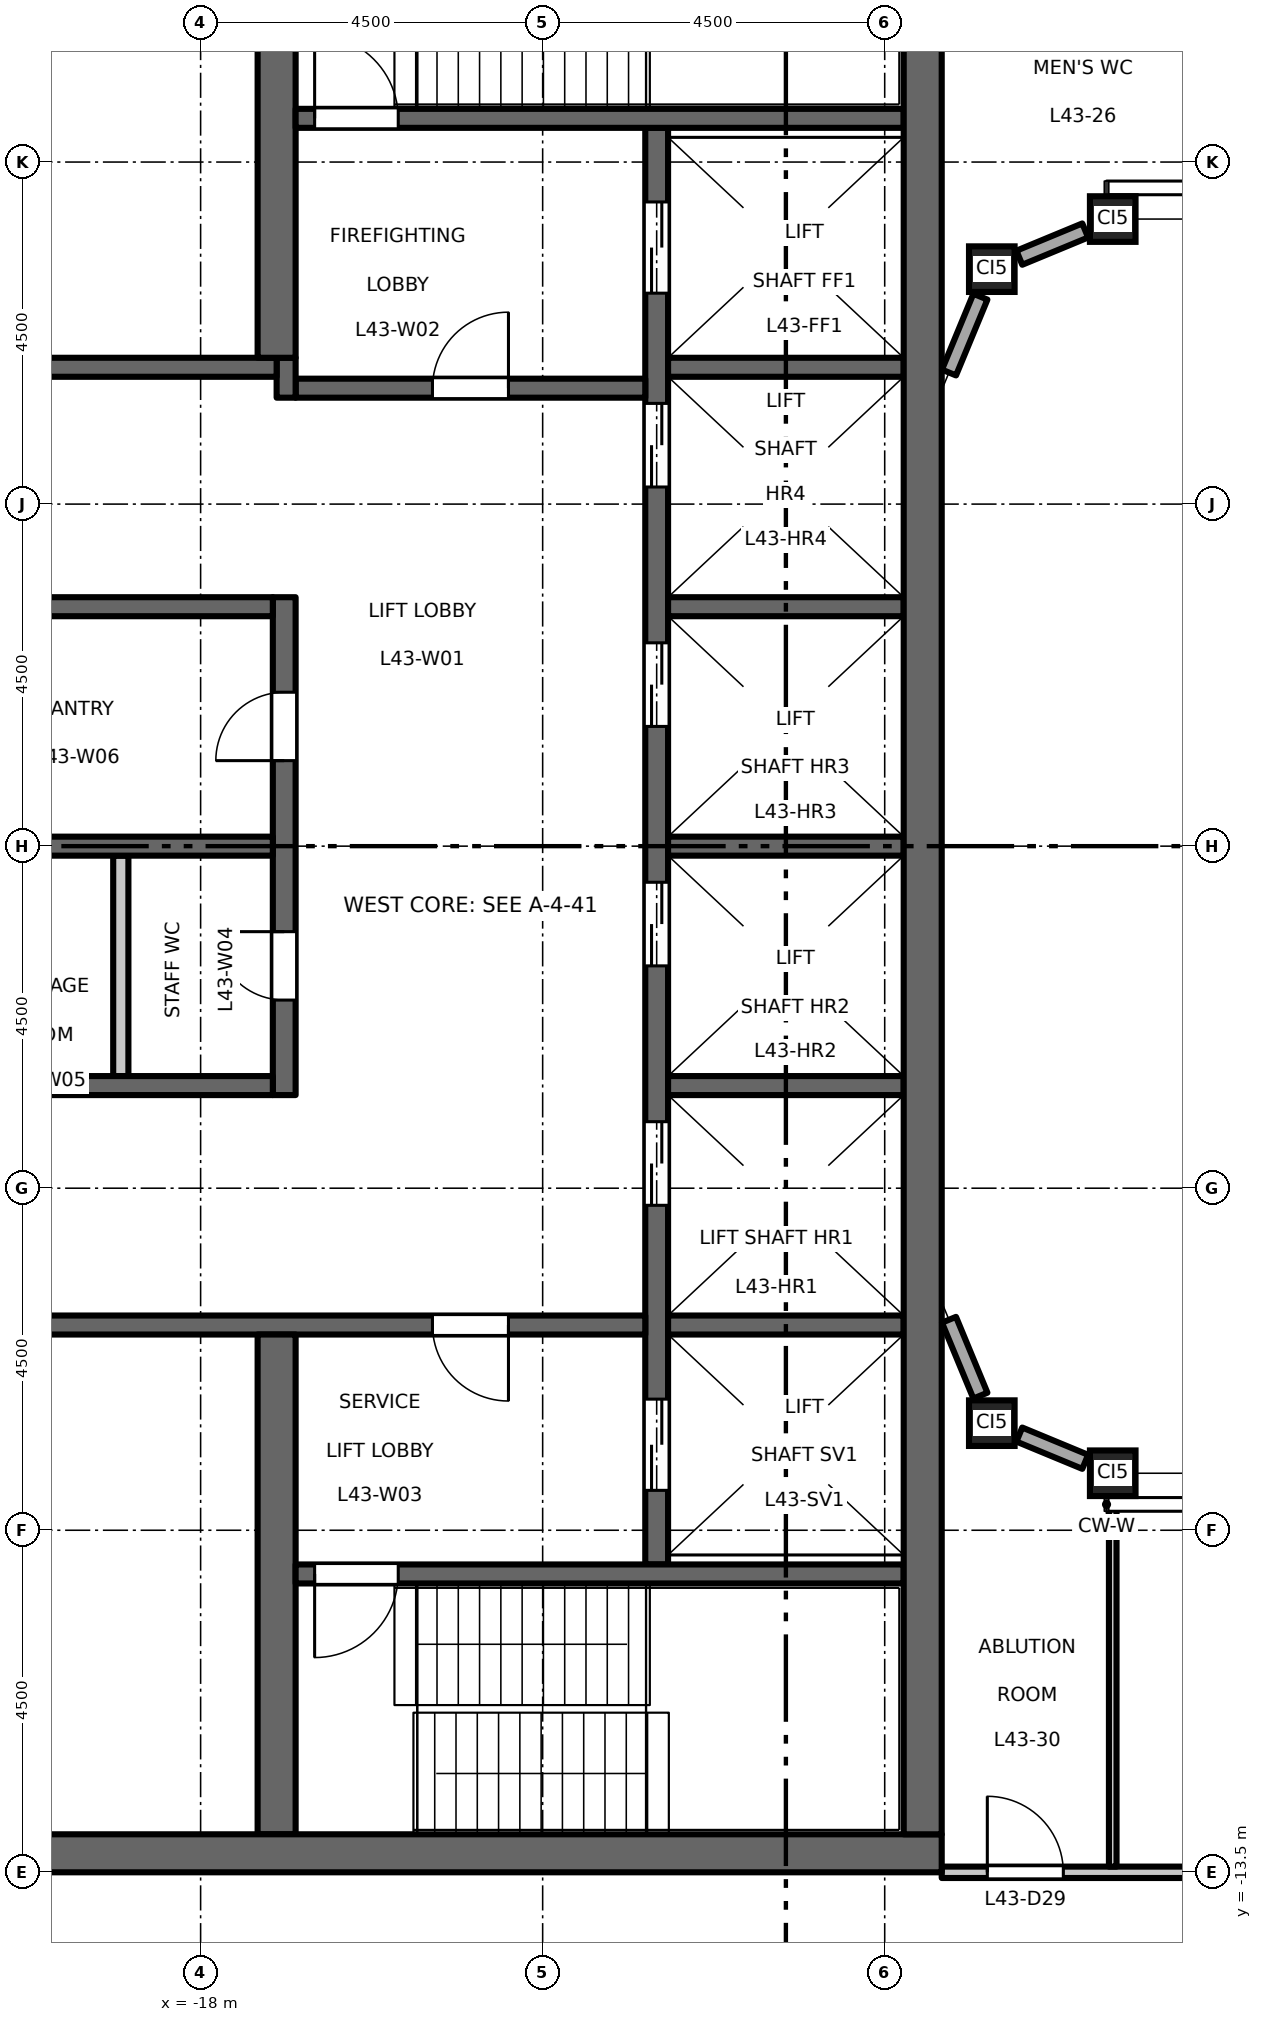
"""IFC4 building model, lengths in metres.
Left out: names, types, materials, properties, quantities, classifications, styles, units other than length and angle.
Written with IfcOpenShell. Run it as: python <this file> out.ifc"""

import sys

from ifc_helpers import new_model, si_unit, direction, frame, frame_2d, origin, origin_2d, place, context, subcontext, project, spatial, rectangle, hollow_rectangle, extrude, element, fill, save


model = new_model("IFC4")
c1 = context("Model", 3, precision=1e-05, world=origin(), true_north=direction((0.0, 1.0)))
c2 = subcontext(c1, "Body", "Model", "MODEL_VIEW")
j1 = project(units=[si_unit("LENGTHUNIT", "METRE"), si_unit("PLANEANGLEUNIT", "RADIAN")], contexts=[c1])
p1 = place(None, origin())
s1 = spatial("IfcSite", under=j1, at=p1, CompositionType="ELEMENT")
p2 = place(p1, origin())
s2 = spatial("IfcBuilding", under=s1, at=p2, CompositionType="ELEMENT")
p3 = place(p2, frame((0.0, 0.0, 201.7)))
s3 = spatial("IfcBuildingStorey", under=s2, at=p3, CompositionType="ELEMENT", Elevation=201.7)
for number, where, z_axis, x_axis in (
    (1, (-7.591, -7.591, 0.0), (0.0, 0.0, 1.0), (1.0, 0.0, 0.0)),
    (2, (-6.0, -8.25, 0.0), (0.0, 0.0, 1.0), (1.0, 0.0, 0.0)),
    (3, (-7.591, 7.591, 0.0), (0.0, 0.0, 1.0), (1.0, 0.0, 0.0)),
    (4, (-6.0, 8.25, 0.0), (0.0, 0.0, 1.0), (1.0, 0.0, 0.0)),
):
    element("IfcColumn", number, at=place(p3, frame(where, z_axis=z_axis, x_axis=x_axis)), inside=s3, PredefinedType="COLUMN", context=c2, shape_type="SweptSolid", body=[
        extrude(hollow_rectangle(XDim=0.6, YDim=0.6, WallThickness=0.032, at=origin_2d()), origin(), (0.0, 0.0, 1.0), 4.5),
    ])
p4 = place(p3, frame((-12.0, -9.45, 0.0), z_axis=(0.0, 0.0, 1.0), x_axis=(0.0, 1.0, 0.0)))
e5 = element("IfcWall", 5, at=p4, inside=s3, PredefinedType="SHEAR", context=c2, shape_type="SweptSolid", body=[
    extrude(rectangle(XDim=18.9, YDim=0.3, at=frame_2d((9.45, 0.0))), origin(), (0.0, 0.0, 1.0), 4.35),
])
p5 = place(p4, frame((4.725, 0.0, 0.0)))
e6 = element("IfcOpeningElement", 6, at=p5, cuts=e5, PredefinedType="OPENING", context=c2, shape_type="SweptSolid", body=[
    extrude(rectangle(XDim=1.1, YDim=2.1, at=frame_2d((0.55, 1.05))), frame((0.0, 0.16, 0.0), z_axis=(0.0, -1.0, 0.0), x_axis=(1.0, 0.0, 0.0)), (0.0, 0.0, 1.0), 0.32),
])
p6 = place(p4, frame((7.875, 0.0, 0.0)))
e7 = element("IfcOpeningElement", 7, at=p6, cuts=e5, PredefinedType="OPENING", context=c2, shape_type="SweptSolid", body=[
    extrude(rectangle(XDim=1.1, YDim=2.1, at=frame_2d((0.55, 1.05))), frame((0.0, 0.16, 0.0), z_axis=(0.0, -1.0, 0.0), x_axis=(1.0, 0.0, 0.0)), (0.0, 0.0, 1.0), 0.32),
])
p7 = place(p4, frame((11.025, 0.0, 0.0)))
e8 = element("IfcOpeningElement", 8, at=p7, cuts=e5, PredefinedType="OPENING", context=c2, shape_type="SweptSolid", body=[
    extrude(rectangle(XDim=1.1, YDim=2.1, at=frame_2d((0.55, 1.05))), frame((0.0, 0.16, 0.0), z_axis=(0.0, -1.0, 0.0), x_axis=(1.0, 0.0, 0.0)), (0.0, 0.0, 1.0), 0.32),
])
p8 = place(p4, frame((14.175, 0.0, 0.0)))
e9 = element("IfcOpeningElement", 9, at=p8, cuts=e5, PredefinedType="OPENING", context=c2, shape_type="SweptSolid", body=[
    extrude(rectangle(XDim=1.1, YDim=2.1, at=frame_2d((0.55, 1.05))), frame((0.0, 0.16, 0.0), z_axis=(0.0, -1.0, 0.0), x_axis=(1.0, 0.0, 0.0)), (0.0, 0.0, 1.0), 0.32),
])
p9 = place(p4, frame((16.725, 0.0, 0.0)))
e10 = element("IfcOpeningElement", 10, at=p9, cuts=e5, PredefinedType="OPENING", context=c2, shape_type="SweptSolid", body=[
    extrude(rectangle(XDim=1.2, YDim=2.1, at=frame_2d((0.6, 1.05))), frame((0.0, 0.16, 0.0), z_axis=(0.0, -1.0, 0.0), x_axis=(1.0, 0.0, 0.0)), (0.0, 0.0, 1.0), 0.32),
])
p10 = place(p4, frame((0.975, 0.0, 0.0)))
e11 = element("IfcOpeningElement", 11, at=p10, cuts=e5, PredefinedType="OPENING", context=c2, shape_type="SweptSolid", body=[
    extrude(rectangle(XDim=1.2, YDim=2.1, at=frame_2d((0.6, 1.05))), frame((0.0, 0.16, 0.0), z_axis=(0.0, -1.0, 0.0), x_axis=(1.0, 0.0, 0.0)), (0.0, 0.0, 1.0), 0.32),
])
p11 = place(p3, frame((-12.15, 6.025, 0.0), z_axis=(0.0, 0.0, 1.0), x_axis=(-1.0, 0.0, 0.0)))
e12 = element("IfcWall", 12, at=p11, inside=s3, PredefinedType="SHEAR", context=c2, shape_type="SweptSolid", body=[
    extrude(rectangle(XDim=4.6, YDim=0.25, at=frame_2d((2.3, 0.0))), origin(), (0.0, 0.0, 1.0), 4.35),
])
p12 = place(p11, frame((1.8, 0.0, 0.0)))
e13 = element("IfcOpeningElement", 13, at=p12, cuts=e12, PredefinedType="OPENING", context=c2, shape_type="SweptSolid", body=[
    extrude(rectangle(XDim=1.0, YDim=2.1, at=frame_2d((0.5, 1.05))), frame((0.0, 0.135, 0.0), z_axis=(0.0, -1.0, 0.0), x_axis=(1.0, 0.0, 0.0)), (0.0, 0.0, 1.0), 0.27),
])
p13 = place(p3, frame((-16.875, 5.9, 0.0), z_axis=(0.0, 0.0, 1.0), x_axis=(0.0, 1.0, 0.0)))
e14 = element("IfcWall", 14, at=p13, inside=s3, PredefinedType="SHEAR", context=c2, shape_type="SweptSolid", body=[
    extrude(rectangle(XDim=0.525, YDim=0.25, at=frame_2d((0.263, 0.0))), origin(), (0.0, 0.0, 1.0), 4.35),
])
p14 = place(p3, frame((-17.0, 6.3, 0.0), z_axis=(0.0, 0.0, 1.0), x_axis=(-1.0, 0.0, 0.0)))
e15 = element("IfcWall", 15, at=p14, inside=s3, PredefinedType="SHEAR", context=c2, shape_type="SweptSolid", body=[
    extrude(rectangle(XDim=4.25, YDim=0.25, at=frame_2d((2.125, 0.0))), origin(), (0.0, 0.0, 1.0), 4.35),
])
p15 = place(p3, frame((-12.15, -6.3, 0.0), z_axis=(0.0, 0.0, 1.0), x_axis=(-1.0, 0.0, 0.0)))
e16 = element("IfcWall", 16, at=p15, inside=s3, PredefinedType="SHEAR", context=c2, shape_type="SweptSolid", body=[
    extrude(rectangle(XDim=9.1, YDim=0.25, at=frame_2d((4.55, 0.0))), origin(), (0.0, 0.0, 1.0), 4.35),
])
p16 = place(p15, frame((1.8, 0.0, 0.0)))
e17 = element("IfcOpeningElement", 17, at=p16, cuts=e16, PredefinedType="OPENING", context=c2, shape_type="SweptSolid", body=[
    extrude(rectangle(XDim=1.0, YDim=2.1, at=frame_2d((0.5, 1.05))), frame((0.0, 0.135, 0.0), z_axis=(0.0, -1.0, 0.0), x_axis=(1.0, 0.0, 0.0)), (0.0, 0.0, 1.0), 0.27),
])
p17 = place(p3, frame((-16.9, -3.275, 0.0), z_axis=(0.0, 0.0, 1.0), x_axis=(0.0, 1.0, 0.0)))
e18 = element("IfcWall", 18, at=p17, inside=s3, PredefinedType="SHEAR", context=c2, shape_type="SweptSolid", body=[
    extrude(rectangle(XDim=6.55, YDim=0.3, at=frame_2d((3.275, 0.0))), origin(), (0.0, 0.0, 1.0), 4.35),
])
p18 = place(p17, frame((1.25, 0.0, 0.0)))
e19 = element("IfcOpeningElement", 19, at=p18, cuts=e18, PredefinedType="OPENING", context=c2, shape_type="SweptSolid", body=[
    extrude(rectangle(XDim=0.9, YDim=2.1, at=frame_2d((0.45, 1.05))), frame((0.0, 0.16, 0.0), z_axis=(0.0, -1.0, 0.0), x_axis=(1.0, 0.0, 0.0)), (0.0, 0.0, 1.0), 0.32),
])
p19 = place(p17, frame((4.4, 0.0, 0.0)))
e20 = element("IfcOpeningElement", 20, at=p19, cuts=e18, PredefinedType="OPENING", context=c2, shape_type="SweptSolid", body=[
    extrude(rectangle(XDim=0.9, YDim=2.1, at=frame_2d((0.45, 1.05))), frame((0.0, 0.16, 0.0), z_axis=(0.0, -1.0, 0.0), x_axis=(1.0, 0.0, 0.0)), (0.0, 0.0, 1.0), 0.32),
])
for number, where, z_axis, x_axis in (
    (21, (-17.05, 0.0, 0.0), (0.0, 0.0, 1.0), (-1.0, 0.0, 0.0)),
    (22, (-17.05, 3.15, 0.0), (0.0, 0.0, 1.0), (-1.0, 0.0, 0.0)),
    (23, (-17.05, -3.15, 0.0), (0.0, 0.0, 1.0), (-1.0, 0.0, 0.0)),
):
    element("IfcWall", number, at=place(p3, frame(where, z_axis=z_axis, x_axis=x_axis)), inside=s3, PredefinedType="SHEAR", context=c2, shape_type="SweptSolid", body=[
        extrude(rectangle(XDim=4.2, YDim=0.25, at=frame_2d((2.1, 0.0))), origin(), (0.0, 0.0, 1.0), 4.35),
    ])
p20 = place(p3, frame((-19.05, -3.025, 0.0), z_axis=(0.0, 0.0, 1.0), x_axis=(0.0, 1.0, 0.0)))
e24 = element("IfcWall", 24, at=p20, inside=s3, PredefinedType="PARTITIONING", context=c2, shape_type="SweptSolid", body=[
    extrude(rectangle(XDim=2.9, YDim=0.2, at=frame_2d((1.45, 0.0))), origin(), (0.0, 0.0, 1.0), 4.35),
])
for number, where, z_axis, x_axis in (
    (25, (-17.0, 6.425, 0.0), (0.0, 0.0, 1.0), (0.0, 1.0, 0.0)),
    (26, (-17.0, -13.0, 0.0), (0.0, 0.0, 1.0), (0.0, 1.0, 0.0)),
):
    element("IfcWall", number, at=place(p3, frame(where, z_axis=z_axis, x_axis=x_axis)), inside=s3, PredefinedType="SHEAR", context=c2, shape_type="SweptSolid", body=[
        extrude(rectangle(XDim=6.575, YDim=0.5, at=frame_2d((3.288, 0.0))), origin(), (0.0, 0.0, 1.0), 4.35),
    ])
for number, where, z_axis, x_axis in (
    (27, (-8.75, 0.0, 0.0), (0.0, 0.0, 1.0), (-1.0, 0.0, 0.0)),
    (28, (-8.75, 3.15, 0.0), (0.0, 0.0, 1.0), (-1.0, 0.0, 0.0)),
    (29, (-8.75, 6.3, 0.0), (0.0, 0.0, 1.0), (-1.0, 0.0, 0.0)),
    (30, (-8.75, -3.15, 0.0), (0.0, 0.0, 1.0), (-1.0, 0.0, 0.0)),
    (31, (-8.75, -6.3, 0.0), (0.0, 0.0, 1.0), (-1.0, 0.0, 0.0)),
):
    element("IfcWall", number, at=place(p3, frame(where, z_axis=z_axis, x_axis=x_axis)), inside=s3, PredefinedType="SHEAR", context=c2, shape_type="SweptSolid", body=[
        extrude(rectangle(XDim=3.1, YDim=0.25, at=frame_2d((1.55, 0.0))), origin(), (0.0, 0.0, 1.0), 4.35),
    ])
p21 = place(p3, frame((-8.75, 9.575, 0.0), z_axis=(0.0, 0.0, 1.0), x_axis=(-1.0, 0.0, 0.0)))
e32 = element("IfcWall", 32, at=p21, inside=s3, PredefinedType="SHEAR", context=c2, shape_type="SweptSolid", body=[
    extrude(rectangle(XDim=8.0, YDim=0.25, at=frame_2d((4.0, 0.0))), origin(), (0.0, 0.0, 1.0), 4.35),
])
p22 = place(p21, frame((6.65, 0.0, 0.0)))
e33 = element("IfcOpeningElement", 33, at=p22, cuts=e32, PredefinedType="OPENING", context=c2, shape_type="SweptSolid", body=[
    extrude(rectangle(XDim=1.1, YDim=2.1, at=frame_2d((0.55, 1.05))), frame((0.0, 0.135, 0.0), z_axis=(0.0, -1.0, 0.0), x_axis=(1.0, 0.0, 0.0)), (0.0, 0.0, 1.0), 0.27),
])
p23 = place(p3, frame((-8.75, -9.575, 0.0), z_axis=(0.0, 0.0, 1.0), x_axis=(-1.0, 0.0, 0.0)))
e34 = element("IfcWall", 34, at=p23, inside=s3, PredefinedType="SHEAR", context=c2, shape_type="SweptSolid", body=[
    extrude(rectangle(XDim=8.0, YDim=0.25, at=frame_2d((4.0, 0.0))), origin(), (0.0, 0.0, 1.0), 4.35),
])
p24 = place(p23, frame((6.65, 0.0, 0.0)))
e35 = element("IfcOpeningElement", 35, at=p24, cuts=e34, PredefinedType="OPENING", context=c2, shape_type="SweptSolid", body=[
    extrude(rectangle(XDim=1.1, YDim=2.1, at=frame_2d((0.55, 1.05))), frame((0.0, 0.135, 0.0), z_axis=(0.0, -1.0, 0.0), x_axis=(1.0, 0.0, 0.0)), (0.0, 0.0, 1.0), 0.27),
])
p25 = place(p3, frame((-8.25, -13.25, 0.0), z_axis=(0.0, 0.0, 1.0), x_axis=(-1.0, 0.0, 0.0)))
e36 = element("IfcWall", 36, at=p25, inside=s3, PredefinedType="SHEAR", context=c2, shape_type="SweptSolid", body=[
    extrude(rectangle(XDim=13.5, YDim=0.5, at=frame_2d((6.75, 0.0))), origin(), (0.0, 0.0, 1.0), 4.35),
])
p26 = place(p3, frame((-8.5, -13.0, 0.0), z_axis=(0.0, 0.0, 1.0), x_axis=(0.0, 1.0, 0.0)))
e37 = element("IfcWall", 37, at=p26, inside=s3, PredefinedType="SHEAR", context=c2, shape_type="SweptSolid", body=[
    extrude(rectangle(XDim=26.0, YDim=0.5, at=frame_2d((13.0, 0.0))), origin(), (0.0, 0.0, 1.0), 4.35),
])
p27 = place(p3, frame((-6.362, 8.1, 0.0), z_axis=(0.0, 0.0, 1.0), x_axis=(-0.923829670615, -0.382803787458, 0.0)))
e38 = element("IfcWall", 38, at=p27, inside=s3, PredefinedType="STANDARD", context=c2, shape_type="SweptSolid", body=[
    extrude(rectangle(XDim=0.938, YDim=0.2, at=frame_2d((0.469, 0.0))), origin(), (0.0, 0.0, 1.0), 3.918),
])
for number, where, z_axis, x_axis in (
    (39, (-7.741, 7.229, 0.0), (0.0, 0.0, 1.0), (-0.383, -0.924, 0.0)),
    (40, (-8.154, -6.231, 0.0), (0.0, 0.0, 1.0), (0.383, -0.924, 0.0)),
):
    element("IfcWall", number, at=place(p3, frame(where, z_axis=z_axis, x_axis=x_axis)), inside=s3, PredefinedType="STANDARD", context=c2, shape_type="SweptSolid", body=[
        extrude(rectangle(XDim=1.08, YDim=0.2, at=frame_2d((0.54, 0.0))), origin(), (0.0, 0.0, 1.0), 3.918),
    ])
p28 = place(p3, frame((-7.229, -7.741, 0.0), z_axis=(0.0, 0.0, 1.0), x_axis=(0.923829670615, -0.382803787458, 0.0)))
e41 = element("IfcWall", 41, at=p28, inside=s3, PredefinedType="STANDARD", context=c2, shape_type="SweptSolid", body=[
    extrude(rectangle(XDim=0.938, YDim=0.2, at=frame_2d((0.469, 0.0))), origin(), (0.0, 0.0, 1.0), 3.918),
])
p29 = place(p3, frame((-8.25, -13.5, 0.0), z_axis=(0.0, 0.0, 1.0), x_axis=(1.0, 0.0, 0.0)))
e42 = element("IfcWall", 42, at=p29, inside=s3, PredefinedType="PARTITIONING", context=c2, shape_type="SweptSolid", body=[
    extrude(rectangle(XDim=16.5, YDim=0.15, at=frame_2d((8.25, 0.0))), origin(), (0.0, 0.0, 1.0), 3.95),
])
p30 = place(p29, frame((0.6, 0.0, 0.0)))
e43 = element("IfcOpeningElement", 43, at=p30, cuts=e42, PredefinedType="OPENING", context=c2, shape_type="SweptSolid", body=[
    extrude(rectangle(XDim=1.0, YDim=2.1, at=frame_2d((0.5, 1.05))), frame((0.0, 0.085, 0.0), z_axis=(0.0, -1.0, 0.0), x_axis=(1.0, 0.0, 0.0)), (0.0, 0.0, 1.0), 0.17),
])
p31 = place(p29, frame((8.85, 0.0, 0.0)))
e44 = element("IfcOpeningElement", 44, at=p31, cuts=e42, PredefinedType="OPENING", context=c2, shape_type="SweptSolid", body=[
    extrude(rectangle(XDim=1.0, YDim=2.1, at=frame_2d((0.5, 1.05))), frame((0.0, 0.085, 0.0), z_axis=(0.0, -1.0, 0.0), x_axis=(1.0, 0.0, 0.0)), (0.0, 0.0, 1.0), 0.17),
])
p32 = place(p3, frame((-6.0, -13.425, 0.0), z_axis=(0.0, 0.0, 1.0), x_axis=(0.0, 1.0, 0.0)))
e45 = element("IfcWall", 45, at=p32, inside=s3, PredefinedType="PARTITIONING", context=c2, shape_type="SweptSolid", body=[
    extrude(rectangle(XDim=4.825, YDim=0.1, at=frame_2d((2.413, 0.0))), origin(), (0.0, 0.0, 1.0), 4.35),
])
p33 = place(p12, origin())
e46 = element("IfcDoor", 46, at=p33, inside=s3, OperationType="SINGLE_SWING_LEFT", PredefinedType="DOOR", context=c2, shape_type="SweptSolid", body=[
    extrude(rectangle(XDim=1.0, YDim=2.1, at=frame_2d((0.5, 1.05))), frame((0.0, 0.025, 0.0), z_axis=(0.0, -1.0, 0.0), x_axis=(1.0, 0.0, 0.0)), (0.0, 0.0, 1.0), 0.05),
])
fill(e13, e46)
p34 = place(p16, origin())
e47 = element("IfcDoor", 47, at=p34, inside=s3, OperationType="SINGLE_SWING_RIGHT", PredefinedType="DOOR", context=c2, shape_type="SweptSolid", body=[
    extrude(rectangle(XDim=1.0, YDim=2.1, at=frame_2d((0.5, 1.05))), frame((0.0, 0.025, 0.0), z_axis=(0.0, -1.0, 0.0), x_axis=(1.0, 0.0, 0.0)), (0.0, 0.0, 1.0), 0.05),
])
fill(e17, e47)
p35 = place(p22, origin())
e48 = element("IfcDoor", 48, at=p35, inside=s3, OperationType="SINGLE_SWING_RIGHT", PredefinedType="DOOR", context=c2, shape_type="SweptSolid", body=[
    extrude(rectangle(XDim=1.1, YDim=2.1, at=frame_2d((0.55, 1.05))), frame((0.0, 0.025, 0.0), z_axis=(0.0, -1.0, 0.0), x_axis=(1.0, 0.0, 0.0)), (0.0, 0.0, 1.0), 0.05),
])
fill(e33, e48)
p36 = place(p24, origin())
e49 = element("IfcDoor", 49, at=p36, inside=s3, OperationType="SINGLE_SWING_LEFT", PredefinedType="DOOR", context=c2, shape_type="SweptSolid", body=[
    extrude(rectangle(XDim=1.1, YDim=2.1, at=frame_2d((0.55, 1.05))), frame((0.0, 0.025, 0.0), z_axis=(0.0, -1.0, 0.0), x_axis=(1.0, 0.0, 0.0)), (0.0, 0.0, 1.0), 0.05),
])
fill(e35, e49)
p37 = place(p5, origin())
e50 = element("IfcDoor", 50, at=p37, inside=s3, OperationType="DOUBLE_DOOR_SLIDING", PredefinedType="DOOR", context=c2, shape_type="SweptSolid", body=[
    extrude(rectangle(XDim=1.1, YDim=2.1, at=frame_2d((0.55, 1.05))), frame((0.0, 0.025, 0.0), z_axis=(0.0, -1.0, 0.0), x_axis=(1.0, 0.0, 0.0)), (0.0, 0.0, 1.0), 0.05),
])
fill(e6, e50)
p38 = place(p6, origin())
e51 = element("IfcDoor", 51, at=p38, inside=s3, OperationType="DOUBLE_DOOR_SLIDING", PredefinedType="DOOR", context=c2, shape_type="SweptSolid", body=[
    extrude(rectangle(XDim=1.1, YDim=2.1, at=frame_2d((0.55, 1.05))), frame((0.0, 0.025, 0.0), z_axis=(0.0, -1.0, 0.0), x_axis=(1.0, 0.0, 0.0)), (0.0, 0.0, 1.0), 0.05),
])
fill(e7, e51)
p39 = place(p7, origin())
e52 = element("IfcDoor", 52, at=p39, inside=s3, OperationType="DOUBLE_DOOR_SLIDING", PredefinedType="DOOR", context=c2, shape_type="SweptSolid", body=[
    extrude(rectangle(XDim=1.1, YDim=2.1, at=frame_2d((0.55, 1.05))), frame((0.0, 0.025, 0.0), z_axis=(0.0, -1.0, 0.0), x_axis=(1.0, 0.0, 0.0)), (0.0, 0.0, 1.0), 0.05),
])
fill(e8, e52)
p40 = place(p8, origin())
e53 = element("IfcDoor", 53, at=p40, inside=s3, OperationType="DOUBLE_DOOR_SLIDING", PredefinedType="DOOR", context=c2, shape_type="SweptSolid", body=[
    extrude(rectangle(XDim=1.1, YDim=2.1, at=frame_2d((0.55, 1.05))), frame((0.0, 0.025, 0.0), z_axis=(0.0, -1.0, 0.0), x_axis=(1.0, 0.0, 0.0)), (0.0, 0.0, 1.0), 0.05),
])
fill(e9, e53)
p41 = place(p9, origin())
e54 = element("IfcDoor", 54, at=p41, inside=s3, OperationType="DOUBLE_DOOR_SLIDING", PredefinedType="DOOR", context=c2, shape_type="SweptSolid", body=[
    extrude(rectangle(XDim=1.2, YDim=2.1, at=frame_2d((0.6, 1.05))), frame((0.0, 0.025, 0.0), z_axis=(0.0, -1.0, 0.0), x_axis=(1.0, 0.0, 0.0)), (0.0, 0.0, 1.0), 0.05),
])
fill(e10, e54)
p42 = place(p10, origin())
e55 = element("IfcDoor", 55, at=p42, inside=s3, OperationType="DOUBLE_DOOR_SLIDING", PredefinedType="DOOR", context=c2, shape_type="SweptSolid", body=[
    extrude(rectangle(XDim=1.2, YDim=2.1, at=frame_2d((0.6, 1.05))), frame((0.0, 0.025, 0.0), z_axis=(0.0, -1.0, 0.0), x_axis=(1.0, 0.0, 0.0)), (0.0, 0.0, 1.0), 0.05),
])
fill(e11, e55)
p43 = place(p18, origin())
e56 = element("IfcDoor", 56, at=p43, inside=s3, OperationType="SINGLE_SWING_LEFT", PredefinedType="DOOR", context=c2, shape_type="SweptSolid", body=[
    extrude(rectangle(XDim=0.9, YDim=2.1, at=frame_2d((0.45, 1.05))), frame((0.0, 0.025, 0.0), z_axis=(0.0, -1.0, 0.0), x_axis=(1.0, 0.0, 0.0)), (0.0, 0.0, 1.0), 0.05),
])
fill(e19, e56)
p44 = place(p19, origin())
e57 = element("IfcDoor", 57, at=p44, inside=s3, OperationType="SINGLE_SWING_RIGHT", PredefinedType="DOOR", context=c2, shape_type="SweptSolid", body=[
    extrude(rectangle(XDim=0.9, YDim=2.1, at=frame_2d((0.45, 1.05))), frame((0.0, 0.025, 0.0), z_axis=(0.0, -1.0, 0.0), x_axis=(1.0, 0.0, 0.0)), (0.0, 0.0, 1.0), 0.05),
])
fill(e20, e57)
p45 = place(p30, origin())
e58 = element("IfcDoor", 58, at=p45, inside=s3, OperationType="SINGLE_SWING_LEFT", PredefinedType="DOOR", context=c2, shape_type="SweptSolid", body=[
    extrude(rectangle(XDim=1.0, YDim=2.1, at=frame_2d((0.5, 1.05))), frame((0.0, 0.025, 0.0), z_axis=(0.0, -1.0, 0.0), x_axis=(1.0, 0.0, 0.0)), (0.0, 0.0, 1.0), 0.05),
])
fill(e43, e58)
save(model, sys.argv[1])
